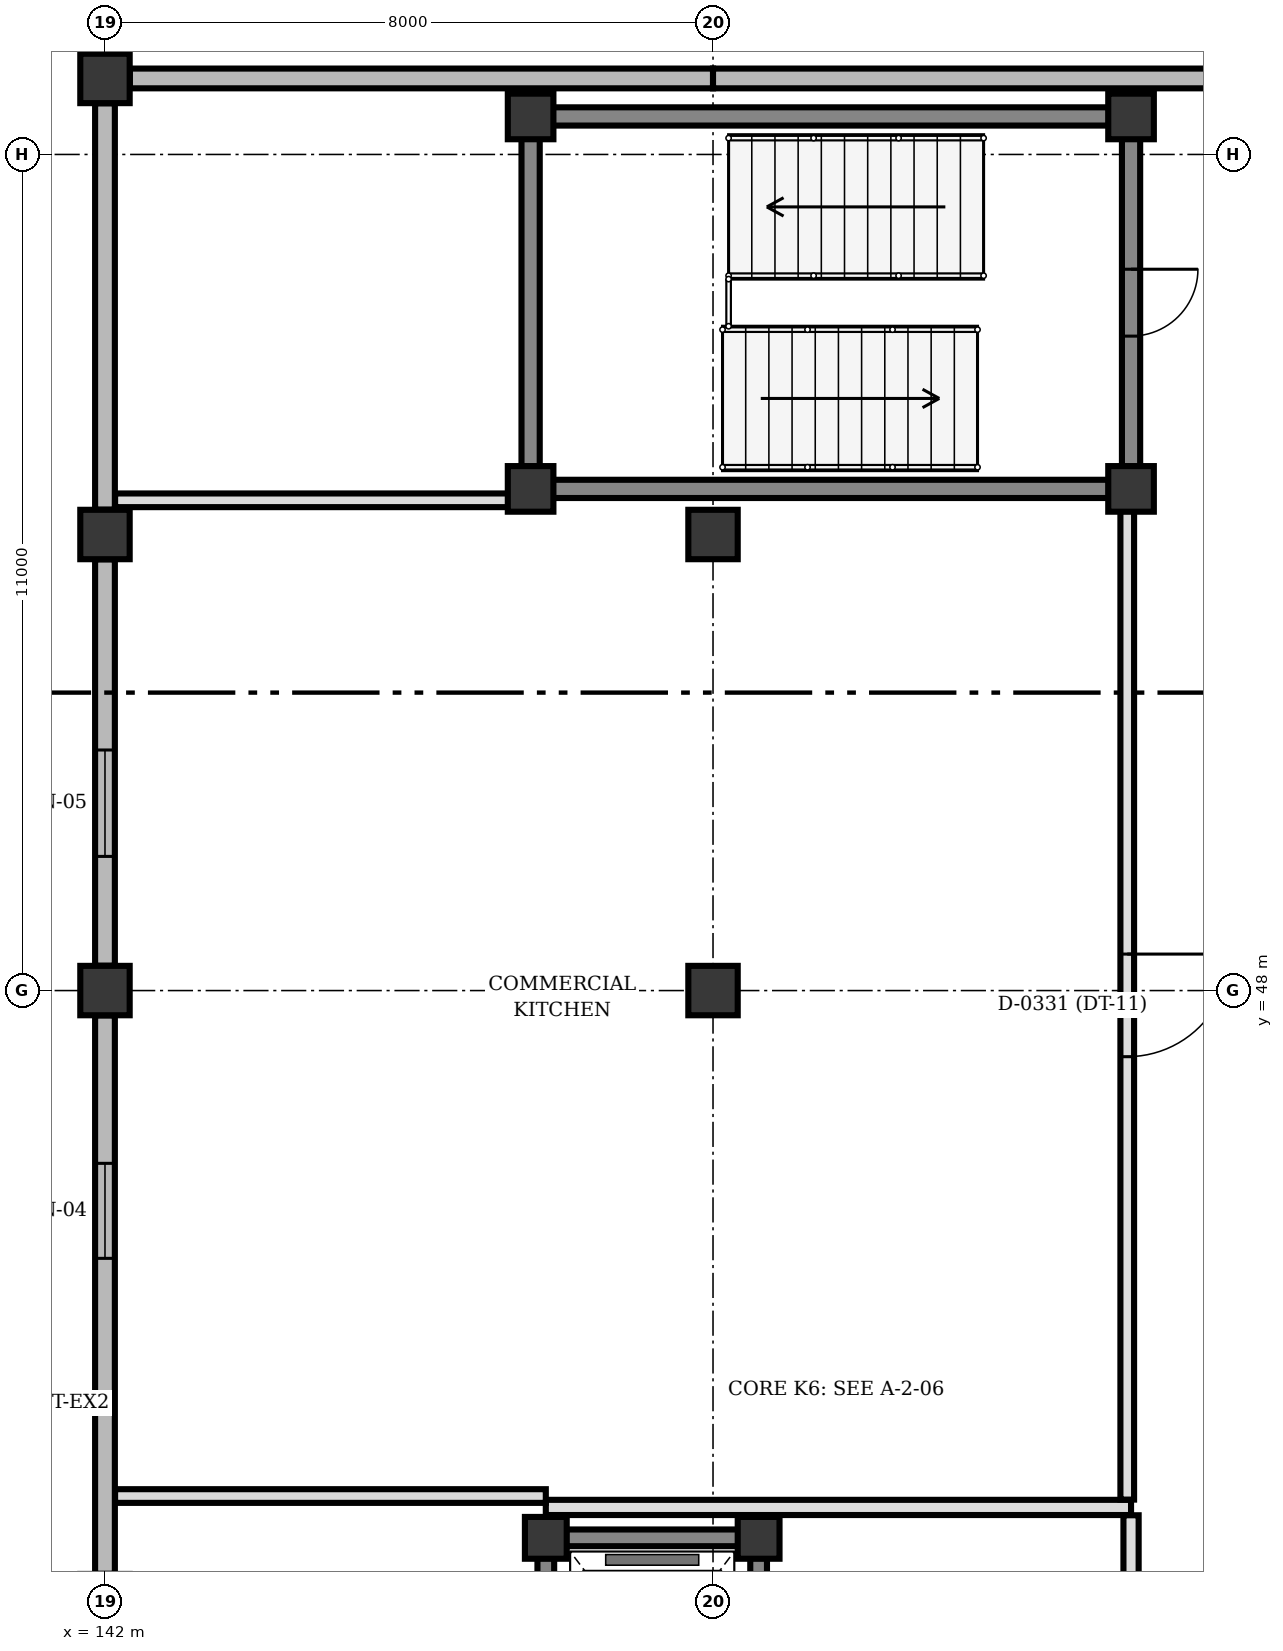
"""IFC4 building model, lengths in metres.
Left out: names, types, materials, properties, quantities, classifications, styles, units other than length and angle.
Written with IfcOpenShell. Run it as: python <this file> out.ifc"""

import sys

from ifc_helpers import new_model, si_unit, direction, frame, frame_2d, origin, origin_2d, place, context, subcontext, project, spatial, rectangle, extrude, element, fill, save


model = new_model("IFC4")
c1 = context("Model", 3, precision=1e-05, world=origin(), true_north=direction((0.0, 1.0)))
c2 = subcontext(c1, "Body", "Model", "MODEL_VIEW")
j1 = project(units=[si_unit("LENGTHUNIT", "METRE"), si_unit("PLANEANGLEUNIT", "RADIAN")], contexts=[c1])
p1 = place(None, origin())
s1 = spatial("IfcSite", under=j1, at=p1, CompositionType="ELEMENT")
p2 = place(p1, origin())
s2 = spatial("IfcBuilding", under=s1, at=p2, CompositionType="ELEMENT")
p3 = place(p2, origin())
s3 = spatial("IfcBuildingStorey", under=s2, at=p3, CompositionType="ELEMENT", Elevation=0.0)
for number, where, z_axis, x_axis in (
    (1, (147.6, 54.6, 0.0), (0.0, 0.0, 1.0), (1.0, 0.0, 0.0)),
    (2, (155.5, 54.6, 0.0), (0.0, 0.0, 1.0), (1.0, 0.0, 0.0)),
    (3, (155.5, 59.5, 0.0), (0.0, 0.0, 1.0), (1.0, 0.0, 0.0)),
    (4, (147.6, 59.5, 0.0), (0.0, 0.0, 1.0), (1.0, 0.0, 0.0)),
):
    element("IfcColumn", number, at=place(p3, frame(where, z_axis=z_axis, x_axis=x_axis)), inside=s3, PredefinedType="COLUMN", context=c2, shape_type="SweptSolid", body=[
        extrude(rectangle(XDim=0.6, YDim=0.6, at=origin_2d()), origin(), (0.0, 0.0, 1.0), 4.5),
    ])
for number, where, z_axis, x_axis in (
    (5, (150.6, 40.8, 0.0), (0.0, 0.0, 1.0), (1.0, 0.0, 0.0)),
    (6, (147.8, 40.8, 0.0), (0.0, 0.0, 1.0), (1.0, 0.0, 0.0)),
):
    element("IfcColumn", number, at=place(p3, frame(where, z_axis=z_axis, x_axis=x_axis)), inside=s3, PredefinedType="COLUMN", context=c2, shape_type="SweptSolid", body=[
        extrude(rectangle(XDim=0.55, YDim=0.55, at=origin_2d()), origin(), (0.0, 0.0, 1.0), 4.5),
    ])
for number, where, z_axis, x_axis in (
    (7, (142.0, 48.0, 0.0), (0.0, 0.0, 1.0), (1.0, 0.0, 0.0)),
    (8, (142.0, 54.0, 0.0), (0.0, 0.0, 1.0), (1.0, 0.0, 0.0)),
    (9, (142.0, 60.0, 0.0), (0.0, 0.0, 1.0), (1.0, 0.0, 0.0)),
    (10, (150.0, 48.0, 0.0), (0.0, 0.0, 1.0), (1.0, 0.0, 0.0)),
    (11, (150.0, 54.0, 0.0), (0.0, 0.0, 1.0), (1.0, 0.0, 0.0)),
):
    element("IfcColumn", number, at=place(p3, frame(where, z_axis=z_axis, x_axis=x_axis)), inside=s3, PredefinedType="COLUMN", context=c2, shape_type="SweptSolid", body=[
        extrude(rectangle(XDim=0.65, YDim=0.65, at=origin_2d()), origin(), (0.0, 0.0, 1.0), 4.5),
    ])
p4 = place(p3, frame((142.0, 40.327, 0.0), z_axis=(0.0, 0.0, 1.0), x_axis=(0.0, 1.0, 0.0)))
e12 = element("IfcWall", 12, at=p4, inside=s3, PredefinedType="SOLIDWALL", context=c2, shape_type="SweptSolid", body=[
    extrude(rectangle(XDim=7.346, YDim=0.26, at=frame_2d((3.673, 0.0))), origin(), (0.0, 0.0, 1.0), 3.55),
])
p5 = place(p4, frame((4.15, 0.0, 0.9)))
e13 = element("IfcOpeningElement", 13, at=p5, cuts=e12, PredefinedType="OPENING", context=c2, shape_type="SweptSolid", body=[
    extrude(rectangle(XDim=1.25, YDim=1.1, at=frame_2d((0.625, 0.55))), frame((0.0, 0.14, 0.0), z_axis=(0.0, -1.0, 0.0), x_axis=(1.0, 0.0, 0.0)), (0.0, 0.0, 1.0), 0.28),
])
p6 = place(p3, frame((142.0, 48.327, 0.0), z_axis=(0.0, 0.0, 1.0), x_axis=(0.0, 1.0, 0.0)))
e14 = element("IfcWall", 14, at=p6, inside=s3, PredefinedType="SOLIDWALL", context=c2, shape_type="SweptSolid", body=[
    extrude(rectangle(XDim=5.346, YDim=0.26, at=frame_2d((2.673, 0.0))), origin(), (0.0, 0.0, 1.0), 3.55),
])
p7 = place(p6, frame((1.438, 0.0, 0.9)))
e15 = element("IfcOpeningElement", 15, at=p7, cuts=e14, PredefinedType="OPENING", context=c2, shape_type="SweptSolid", body=[
    extrude(rectangle(XDim=1.4, YDim=1.1, at=frame_2d((0.7, 0.55))), frame((0.0, 0.14, 0.0), z_axis=(0.0, -1.0, 0.0), x_axis=(1.0, 0.0, 0.0)), (0.0, 0.0, 1.0), 0.28),
])
p8 = place(p3, frame((142.0, 54.327, 0.0), z_axis=(0.0, 0.0, 1.0), x_axis=(0.0, 1.0, 0.0)))
e16 = element("IfcWall", 16, at=p8, inside=s3, PredefinedType="SOLIDWALL", context=c2, shape_type="SweptSolid", body=[
    extrude(rectangle(XDim=5.346, YDim=0.26, at=frame_2d((2.673, 0.0))), origin(), (0.0, 0.0, 1.0), 3.55),
])
for number, where, z_axis, x_axis in (
    (17, (142.327, 60.0, 0.0), (0.0, 0.0, 1.0), (1.0, 0.0, 0.0)),
    (18, (150.0, 60.0, 0.0), (0.0, 0.0, 1.0), (1.0, 0.0, 0.0)),
):
    element("IfcWall", number, at=place(p3, frame(where, z_axis=z_axis, x_axis=x_axis)), inside=s3, PredefinedType="SOLIDWALL", context=c2, shape_type="SweptSolid", body=[
        extrude(rectangle(XDim=7.673, YDim=0.26, at=frame_2d((3.836, 0.0))), origin(), (0.0, 0.0, 1.0), 3.55),
    ])
p9 = place(p3, frame((147.6, 54.892, 0.0), z_axis=(0.0, 0.0, 1.0), x_axis=(0.0, 1.0, 0.0)))
e19 = element("IfcWall", 19, at=p9, inside=s3, PredefinedType="SHEAR", context=c2, shape_type="SweptSolid", body=[
    extrude(rectangle(XDim=4.316, YDim=0.24, at=frame_2d((2.158, 0.0))), origin(), (0.0, 0.0, 1.0), 4.24),
])
p10 = place(p3, frame((155.5, 59.208, 0.0), z_axis=(0.0, 0.0, 1.0), x_axis=(0.0, -1.0, 0.0)))
e20 = element("IfcWall", 20, at=p10, inside=s3, PredefinedType="SHEAR", context=c2, shape_type="SweptSolid", body=[
    extrude(rectangle(XDim=4.316, YDim=0.24, at=frame_2d((2.158, 0.0))), origin(), (0.0, 0.0, 1.0), 4.24),
])
p11 = place(p10, frame((1.718, 0.0, 0.0)))
e21 = element("IfcOpeningElement", 21, at=p11, cuts=e20, PredefinedType="OPENING", context=c2, shape_type="SweptSolid", body=[
    extrude(rectangle(XDim=0.88, YDim=2.1, at=frame_2d((0.44, 1.05))), frame((0.0, 0.13, 0.0), z_axis=(0.0, -1.0, 0.0), x_axis=(1.0, 0.0, 0.0)), (0.0, 0.0, 1.0), 0.26),
])
for number, where, z_axis, x_axis in (
    (22, (155.208, 54.6, 0.0), (0.0, 0.0, 1.0), (-1.0, 0.0, 0.0)),
    (23, (155.208, 59.5, 0.0), (0.0, 0.0, 1.0), (-1.0, 0.0, 0.0)),
):
    element("IfcWall", number, at=place(p3, frame(where, z_axis=z_axis, x_axis=x_axis)), inside=s3, PredefinedType="SHEAR", context=c2, shape_type="SweptSolid", body=[
        extrude(rectangle(XDim=7.316, YDim=0.24, at=frame_2d((3.658, 0.0))), origin(), (0.0, 0.0, 1.0), 4.24),
    ])
p12 = place(p3, frame((150.6, 37.867, 0.0), z_axis=(0.0, 0.0, 1.0), x_axis=(0.0, 1.0, 0.0)))
e24 = element("IfcWall", 24, at=p12, inside=s3, PredefinedType="SHEAR", context=c2, shape_type="SweptSolid", body=[
    extrude(rectangle(XDim=2.666, YDim=0.22, at=frame_2d((1.333, 0.0))), origin(), (0.0, 0.0, 1.0), 4.24),
])
p13 = place(p12, frame((0.733, 0.0, 0.0)))
e25 = element("IfcOpeningElement", 25, at=p13, cuts=e24, PredefinedType="OPENING", context=c2, shape_type="SweptSolid", body=[
    extrude(rectangle(XDim=1.2, YDim=2.15, at=frame_2d((0.6, 1.075))), frame((0.0, 0.12, 0.0), z_axis=(0.0, -1.0, 0.0), x_axis=(1.0, 0.0, 0.0)), (0.0, 0.0, 1.0), 0.24),
])
p14 = place(p3, frame((150.333, 40.8, 0.0), z_axis=(0.0, 0.0, 1.0), x_axis=(-1.0, 0.0, 0.0)))
e26 = element("IfcWall", 26, at=p14, inside=s3, PredefinedType="SHEAR", context=c2, shape_type="SweptSolid", body=[
    extrude(rectangle(XDim=2.266, YDim=0.22, at=frame_2d((1.133, 0.0))), origin(), (0.0, 0.0, 1.0), 4.24),
])
p15 = place(p3, frame((147.8, 40.533, 0.0), z_axis=(0.0, 0.0, 1.0), x_axis=(0.0, -1.0, 0.0)))
e27 = element("IfcWall", 27, at=p15, inside=s3, PredefinedType="SHEAR", context=c2, shape_type="SweptSolid", body=[
    extrude(rectangle(XDim=2.666, YDim=0.22, at=frame_2d((1.333, 0.0))), origin(), (0.0, 0.0, 1.0), 4.24),
])
p16 = place(p3, frame((147.8, 41.2, 0.0), z_axis=(0.0, 0.0, 1.0), x_axis=(1.0, 0.0, 0.0)))
e28 = element("IfcWall", 28, at=p16, inside=s3, PredefinedType="PARTITIONING", context=c2, shape_type="SweptSolid", body=[
    extrude(rectangle(XDim=7.7, YDim=0.2, at=frame_2d((3.85, 0.0))), origin(), (0.0, 0.0, 1.0), 4.2),
])
p17 = place(p3, frame((155.5, 37.703, 0.0), z_axis=(0.0, 0.0, 1.0), x_axis=(0.0, 1.0, 0.0)))
e29 = element("IfcWall", 29, at=p17, inside=s3, PredefinedType="PARTITIONING", context=c2, shape_type="SweptSolid", body=[
    extrude(rectangle(XDim=3.394, YDim=0.2, at=frame_2d((1.697, 0.0))), origin(), (0.0, 0.0, 1.0), 4.2),
])
p18 = place(p17, frame((1.167, 0.0, 0.0)))
e30 = element("IfcOpeningElement", 30, at=p18, cuts=e29, PredefinedType="OPENING", context=c2, shape_type="SweptSolid", body=[
    extrude(rectangle(XDim=1.06, YDim=2.2, at=frame_2d((0.53, 1.1))), frame((0.0, 0.11, 0.0), z_axis=(0.0, -1.0, 0.0), x_axis=(1.0, 0.0, 0.0)), (0.0, 0.0, 1.0), 0.22),
])
p19 = place(p3, frame((142.133, 54.45, 0.0), z_axis=(0.0, 0.0, 1.0), x_axis=(1.0, 0.0, 0.0)))
e31 = element("IfcWall", 31, at=p19, inside=s3, PredefinedType="PARTITIONING", context=c2, shape_type="SweptSolid", body=[
    extrude(rectangle(XDim=5.175, YDim=0.18, at=frame_2d((2.587, 0.0))), origin(), (0.0, 0.0, 1.0), 3.672),
])
p20 = place(p3, frame((155.45, 54.308, 0.0), z_axis=(0.0, 0.0, 1.0), x_axis=(0.0, -1.0, 0.0)))
e32 = element("IfcWall", 32, at=p20, inside=s3, PredefinedType="PARTITIONING", context=c2, shape_type="SweptSolid", body=[
    extrude(rectangle(XDim=13.005, YDim=0.18, at=frame_2d((6.502, 0.0))), origin(), (0.0, 0.0, 1.0), 3.572),
])
p21 = place(p20, frame((5.828, 0.0, 0.0)))
e33 = element("IfcOpeningElement", 33, at=p21, cuts=e32, PredefinedType="OPENING", context=c2, shape_type="SweptSolid", body=[
    extrude(rectangle(XDim=1.35, YDim=2.2, at=frame_2d((0.675, 1.1))), frame((0.0, 0.1, 0.0), z_axis=(0.0, -1.0, 0.0), x_axis=(1.0, 0.0, 0.0)), (0.0, 0.0, 1.0), 0.2),
])
p22 = place(p3, frame((147.8, 41.35, 0.0), z_axis=(0.0, 0.0, 1.0), x_axis=(-1.0, 0.0, 0.0)))
e34 = element("IfcWall", 34, at=p22, inside=s3, PredefinedType="PARTITIONING", context=c2, shape_type="SweptSolid", body=[
    extrude(rectangle(XDim=5.667, YDim=0.18, at=frame_2d((2.833, 0.0))), origin(), (0.0, 0.0, 1.0), 3.672),
])
p23 = place(p5, origin())
e35 = element("IfcWindow", 35, at=p23, inside=s3, PartitioningType="SINGLE_PANEL", PredefinedType="WINDOW", context=c2, shape_type="SweptSolid", body=[
    extrude(rectangle(XDim=1.25, YDim=1.1, at=frame_2d((0.625, 0.55))), frame((0.0, 0.03, 0.0), z_axis=(0.0, -1.0, 0.0), x_axis=(1.0, 0.0, 0.0)), (0.0, 0.0, 1.0), 0.06),
])
fill(e13, e35)
p24 = place(p7, origin())
e36 = element("IfcWindow", 36, at=p24, inside=s3, PartitioningType="SINGLE_PANEL", PredefinedType="WINDOW", context=c2, shape_type="SweptSolid", body=[
    extrude(rectangle(XDim=1.4, YDim=1.1, at=frame_2d((0.7, 0.55))), frame((0.0, 0.03, 0.0), z_axis=(0.0, -1.0, 0.0), x_axis=(1.0, 0.0, 0.0)), (0.0, 0.0, 1.0), 0.06),
])
fill(e15, e36)
p25 = place(p11, origin())
e37 = element("IfcDoor", 37, at=p25, inside=s3, OperationType="SINGLE_SWING_LEFT", PredefinedType="DOOR", context=c2, shape_type="SweptSolid", body=[
    extrude(rectangle(XDim=0.88, YDim=2.1, at=frame_2d((0.44, 1.05))), frame((0.0, 0.025, 0.0), z_axis=(0.0, -1.0, 0.0), x_axis=(1.0, 0.0, 0.0)), (0.0, 0.0, 1.0), 0.05),
])
fill(e21, e37)
p26 = place(p21, origin())
e38 = element("IfcDoor", 38, at=p26, inside=s3, OperationType="SINGLE_SWING_LEFT", PredefinedType="DOOR", context=c2, shape_type="SweptSolid", body=[
    extrude(rectangle(XDim=1.35, YDim=2.2, at=frame_2d((0.675, 1.1))), frame((0.0, 0.025, 0.0), z_axis=(0.0, -1.0, 0.0), x_axis=(1.0, 0.0, 0.0)), (0.0, 0.0, 1.0), 0.05),
])
fill(e33, e38)
save(model, sys.argv[1])
